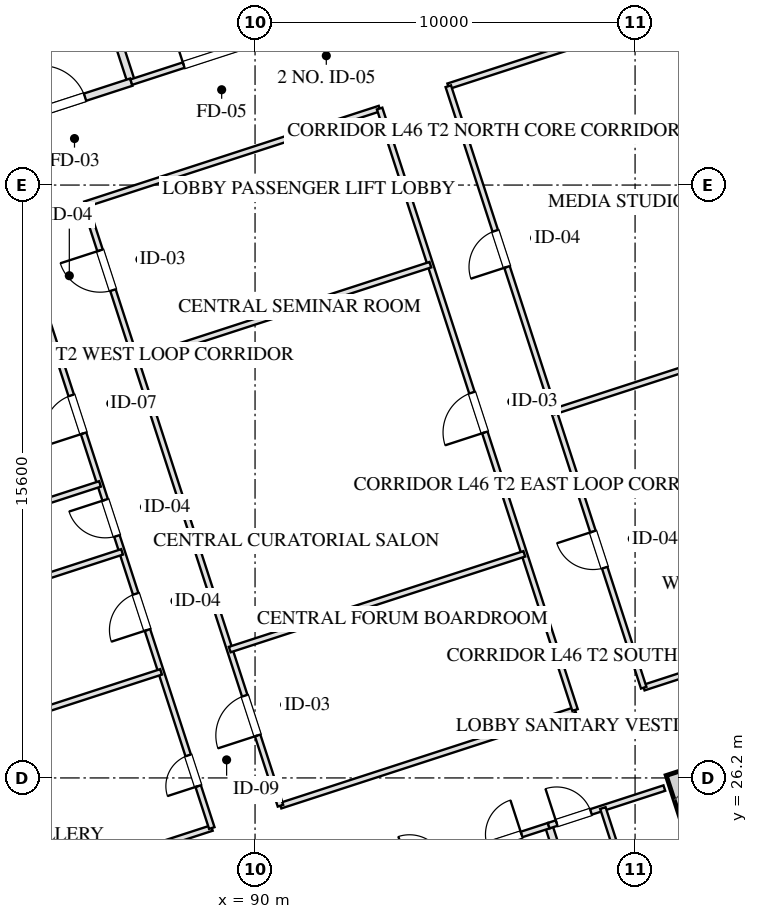
"""IFC4 building model, lengths in metres.
Left out: names, types, materials, properties, quantities, classifications, styles, units other than length and angle.
Written with IfcOpenShell. Run it as: python <this file> out.ifc"""

import sys

from ifc_helpers import new_model, si_unit, direction, frame, frame_2d, origin, place, context, subcontext, project, spatial, rectangle, extrude, element, fill, save


model = new_model("IFC4")
c1 = context("Model", 3, precision=1e-05, world=origin(), true_north=direction((0.0, 1.0)))
c2 = subcontext(c1, "Body", "Model", "MODEL_VIEW")
j1 = project(units=[si_unit("LENGTHUNIT", "METRE"), si_unit("PLANEANGLEUNIT", "RADIAN")], contexts=[c1])
p1 = place(None, origin())
s1 = spatial("IfcSite", under=j1, at=p1, CompositionType="ELEMENT")
p2 = place(p1, origin())
s2 = spatial("IfcBuilding", under=s1, at=p2, CompositionType="ELEMENT")
p3 = place(p2, frame((0.0, 0.0, 173.65)))
s3 = spatial("IfcBuildingStorey", under=s2, at=p3, CompositionType="ELEMENT", Elevation=173.65)
p4 = place(p3, frame((101.105, 26.358, 0.0), z_axis=(0.0, 0.0, 1.0), x_axis=(0.309010370028, -0.95105866865, 0.0)))
e1 = element("IfcWall", 1, at=p4, inside=s3, PredefinedType="SHEAR", context=c2, shape_type="SweptSolid", body=[
    extrude(rectangle(XDim=9.48, YDim=0.6, at=frame_2d((4.74, 0.0))), origin(), (0.0, 0.0, 1.0), 3.45),
])
p5 = place(p3, frame((98.224, 59.173, 0.0), z_axis=(0.0, 0.0, 1.0), x_axis=(0.309014228706, -0.951057414911, 0.0)))
e2 = element("IfcWall", 2, at=p5, inside=s3, PredefinedType="SOLIDWALL", context=c2, shape_type="SweptSolid", body=[
    extrude(rectangle(XDim=42.8, YDim=0.4, at=frame_2d((21.4, 0.0))), origin(), (0.0, 0.0, 1.0), 2.61),
])
p6 = place(p5, frame((17.675, 0.0, 0.75)))
e3 = element("IfcOpeningElement", 3, at=p6, cuts=e2, PredefinedType="OPENING", context=c2, shape_type="SweptSolid", body=[
    extrude(rectangle(XDim=2.25, YDim=1.46, at=frame_2d((1.125, 0.73))), frame((0.0, 0.21, 0.0), z_axis=(0.0, -1.0, 0.0), x_axis=(1.0, 0.0, 0.0)), (0.0, 0.0, 1.0), 0.42),
])
p7 = place(p5, frame((13.875, 0.0, 0.75)))
e4 = element("IfcOpeningElement", 4, at=p7, cuts=e2, PredefinedType="OPENING", context=c2, shape_type="SweptSolid", body=[
    extrude(rectangle(XDim=2.25, YDim=1.46, at=frame_2d((1.125, 0.73))), frame((0.0, 0.21, 0.0), z_axis=(0.0, -1.0, 0.0), x_axis=(1.0, 0.0, 0.0)), (0.0, 0.0, 1.0), 0.42),
])
p8 = place(p5, frame((25.25, 0.0, 0.0)))
e5 = element("IfcOpeningElement", 5, at=p8, cuts=e2, PredefinedType="OPENING", context=c2, shape_type="SweptSolid", body=[
    extrude(rectangle(XDim=1.1, YDim=2.15, at=frame_2d((0.55, 1.075))), frame((0.0, 0.21, 0.0), z_axis=(0.0, -1.0, 0.0), x_axis=(1.0, 0.0, 0.0)), (0.0, 0.0, 1.0), 0.42),
])
p9 = place(p3, frame((97.727, 24.944, 0.0), z_axis=(0.0, 0.0, 1.0), x_axis=(0.309016001439, -0.951056838919, 0.0)))
e6 = element("IfcWall", 6, at=p9, inside=s3, PredefinedType="PARTITIONING", context=c2, shape_type="SweptSolid", body=[
    extrude(rectangle(XDim=8.43, YDim=0.2, at=frame_2d((4.215, 0.0))), origin(), (0.0, 0.0, 1.0), 3.175),
])
p10 = place(p3, frame((93.542, 23.585, 0.0), z_axis=(0.0, 0.0, 1.0), x_axis=(0.951063829732, 0.308994485023, 0.0)))
e7 = element("IfcWall", 7, at=p10, inside=s3, PredefinedType="PARTITIONING", context=c2, shape_type="SweptSolid", body=[
    extrude(rectangle(XDim=4.4, YDim=0.15, at=frame_2d((2.2, 0.0))), origin(), (0.0, 0.0, 1.0), 3.175),
])
p11 = place(p10, frame((0.55, 0.0, 0.0)))
e8 = element("IfcOpeningElement", 8, at=p11, cuts=e7, PredefinedType="OPENING", context=c2, shape_type="SweptSolid", body=[
    extrude(rectangle(XDim=0.95, YDim=2.05, at=frame_2d((0.475, 1.025))), frame((0.0, 0.085, 0.0), z_axis=(0.0, -1.0, 0.0), x_axis=(1.0, 0.0, 0.0)), (0.0, 0.0, 1.0), 0.17),
])
p12 = place(p10, frame((2.7, 0.0, 0.0)))
e9 = element("IfcOpeningElement", 9, at=p12, cuts=e7, PredefinedType="OPENING", context=c2, shape_type="SweptSolid", body=[
    extrude(rectangle(XDim=0.95, YDim=2.05, at=frame_2d((0.475, 1.025))), frame((0.0, 0.085, 0.0), z_axis=(0.0, -1.0, 0.0), x_axis=(1.0, 0.0, 0.0)), (0.0, 0.0, 1.0), 0.17),
])
p13 = place(p3, frame((97.727, 24.944, 0.0), z_axis=(0.0, 0.0, 1.0), x_axis=(0.951036872128, 0.309077446369, 0.0)))
e10 = element("IfcWall", 10, at=p13, inside=s3, PredefinedType="PARTITIONING", context=c2, shape_type="SweptSolid", body=[
    extrude(rectangle(XDim=3.2, YDim=0.15, at=frame_2d((1.6, 0.0))), origin(), (0.0, 0.0, 1.0), 3.175),
])
p14 = place(p13, frame((0.22, 0.0, 0.0)))
e11 = element("IfcOpeningElement", 11, at=p14, cuts=e10, PredefinedType="OPENING", context=c2, shape_type="SweptSolid", body=[
    extrude(rectangle(XDim=0.95, YDim=2.05, at=frame_2d((0.475, 1.025))), frame((0.0, 0.085, 0.0), z_axis=(0.0, -1.0, 0.0), x_axis=(1.0, 0.0, 0.0)), (0.0, 0.0, 1.0), 0.17),
])
p15 = place(p3, frame((99.153, 25.408, 0.0), z_axis=(0.0, 0.0, 1.0), x_axis=(0.309016001439, -0.951056838919, 0.0)))
e12 = element("IfcWall", 12, at=p15, inside=s3, PredefinedType="PARTITIONING", context=c2, shape_type="SweptSolid", body=[
    extrude(rectangle(XDim=8.43, YDim=0.15, at=frame_2d((4.215, 0.0))), origin(), (0.0, 0.0, 1.0), 3.175),
])
p16 = place(p15, frame((2.55, 0.0, 0.0)))
e13 = element("IfcOpeningElement", 13, at=p16, cuts=e12, PredefinedType="OPENING", context=c2, shape_type="SweptSolid", body=[
    extrude(rectangle(XDim=0.95, YDim=2.05, at=frame_2d((0.475, 1.025))), frame((0.0, 0.085, 0.0), z_axis=(0.0, -1.0, 0.0), x_axis=(1.0, 0.0, 0.0)), (0.0, 0.0, 1.0), 0.17),
])
p17 = place(p15, frame((5.8, 0.0, 0.0)))
e14 = element("IfcOpeningElement", 14, at=p17, cuts=e12, PredefinedType="OPENING", context=c2, shape_type="SweptSolid", body=[
    extrude(rectangle(XDim=0.9, YDim=2.05, at=frame_2d((0.45, 1.025))), frame((0.0, 0.085, 0.0), z_axis=(0.0, -1.0, 0.0), x_axis=(1.0, 0.0, 0.0)), (0.0, 0.0, 1.0), 0.17),
])
p18 = place(p3, frame((86.743, 44.508, 0.0), z_axis=(0.0, 0.0, 1.0), x_axis=(-0.309016001439, 0.951056838919, 0.0)))
e15 = element("IfcWall", 15, at=p18, inside=s3, PredefinedType="PARTITIONING", context=c2, shape_type="SweptSolid", body=[
    extrude(rectangle(XDim=8.43, YDim=0.2, at=frame_2d((4.215, 0.0))), origin(), (0.0, 0.0, 1.0), 3.175),
])
p19 = place(p3, frame((83.101, 43.324, 0.0), z_axis=(0.0, 0.0, 1.0), x_axis=(0.951052804469, 0.309028417967, 0.0)))
e16 = element("IfcWall", 16, at=p19, inside=s3, PredefinedType="PARTITIONING", context=c2, shape_type="SweptSolid", body=[
    extrude(rectangle(XDim=3.83, YDim=0.2, at=frame_2d((1.915, 0.0))), origin(), (0.0, 0.0, 1.0), 3.175),
])
p20 = place(p19, frame((1.35, 0.0, 0.0)))
e17 = element("IfcOpeningElement", 17, at=p20, cuts=e16, PredefinedType="OPENING", context=c2, shape_type="SweptSolid", body=[
    extrude(rectangle(XDim=1.2, YDim=2.05, at=frame_2d((0.6, 1.025))), frame((0.0, 0.11, 0.0), z_axis=(0.0, -1.0, 0.0), x_axis=(1.0, 0.0, 0.0)), (0.0, 0.0, 1.0), 0.22),
])
p21 = place(p3, frame((86.743, 44.508, 0.0), z_axis=(0.0, 0.0, 1.0), x_axis=(0.951063829732, 0.308994485023, 0.0)))
e18 = element("IfcWall", 18, at=p21, inside=s3, PredefinedType="PARTITIONING", context=c2, shape_type="SweptSolid", body=[
    extrude(rectangle(XDim=4.4, YDim=0.15, at=frame_2d((2.2, 0.0))), origin(), (0.0, 0.0, 1.0), 3.175),
])
p22 = place(p21, frame((1.45, 0.0, 0.0)))
e19 = element("IfcOpeningElement", 19, at=p22, cuts=e18, PredefinedType="OPENING", context=c2, shape_type="SweptSolid", body=[
    extrude(rectangle(XDim=1.5, YDim=2.05, at=frame_2d((0.75, 1.025))), frame((0.0, 0.085, 0.0), z_axis=(0.0, -1.0, 0.0), x_axis=(1.0, 0.0, 0.0)), (0.0, 0.0, 1.0), 0.17),
])
p23 = place(p3, frame((77.925, 21.328, 0.0), z_axis=(0.0, 0.0, 1.0), x_axis=(0.951054972381, 0.309021746015, 0.0)))
e20 = element("IfcWall", 20, at=p23, inside=s3, PredefinedType="PARTITIONING", context=c2, shape_type="SweptSolid", body=[
    extrude(rectangle(XDim=11.5, YDim=0.15, at=frame_2d((5.75, 0.0))), origin(), (0.0, 0.0, 1.0), 3.175),
])
p24 = place(p3, frame((90.669, 25.469, 0.0), z_axis=(0.0, 0.0, 1.0), x_axis=(0.95106136293, 0.309002077568, 0.0)))
e21 = element("IfcWall", 21, at=p24, inside=s3, PredefinedType="PARTITIONING", context=c2, shape_type="SweptSolid", body=[
    extrude(rectangle(XDim=8.15, YDim=0.15, at=frame_2d((4.075, 0.0))), origin(), (0.0, 0.0, 1.0), 3.175),
])
p25 = place(p3, frame((100.227, 28.575, 0.0), z_axis=(0.0, 0.0, 1.0), x_axis=(0.95104773735, 0.309044011885, 0.0)))
e22 = element("IfcWall", 22, at=p25, inside=s3, PredefinedType="PARTITIONING", context=c2, shape_type="SweptSolid", body=[
    extrude(rectangle(XDim=7.35, YDim=0.15, at=frame_2d((3.675, 0.0))), origin(), (0.0, 0.0, 1.0), 3.175),
])
p26 = place(p3, frame((85.527, 41.295, 0.0), z_axis=(0.0, 0.0, 1.0), x_axis=(0.951055419664, 0.309020369437, 0.0)))
e23 = element("IfcWall", 23, at=p26, inside=s3, PredefinedType="PARTITIONING", context=c2, shape_type="SweptSolid", body=[
    extrude(rectangle(XDim=8.15, YDim=0.15, at=frame_2d((4.075, 0.0))), origin(), (0.0, 0.0, 1.0), 3.175),
])
p27 = place(p3, frame((95.085, 44.4, 0.0), z_axis=(0.0, 0.0, 1.0), x_axis=(0.95105749975, 0.309013967595, 0.0)))
e24 = element("IfcWall", 24, at=p27, inside=s3, PredefinedType="PARTITIONING", context=c2, shape_type="SweptSolid", body=[
    extrude(rectangle(XDim=7.35, YDim=0.15, at=frame_2d((3.675, 0.0))), origin(), (0.0, 0.0, 1.0), 3.175),
])
p28 = place(p3, frame((88.862, 24.882, 0.0), z_axis=(0.0, 0.0, 1.0), x_axis=(-0.309008771245, 0.951059188113, 0.0)))
e25 = element("IfcWall", 25, at=p28, inside=s3, PredefinedType="PARTITIONING", context=c2, shape_type="SweptSolid", body=[
    extrude(rectangle(XDim=16.64, YDim=0.15, at=frame_2d((8.32, 0.0))), origin(), (0.0, 0.0, 1.0), 3.175),
])
p29 = place(p28, frame((1.16, 0.0, 0.0)))
e26 = element("IfcOpeningElement", 26, at=p29, cuts=e25, PredefinedType="OPENING", context=c2, shape_type="SweptSolid", body=[
    extrude(rectangle(XDim=0.85, YDim=2.05, at=frame_2d((0.425, 1.025))), frame((0.0, 0.085, 0.0), z_axis=(0.0, -1.0, 0.0), x_axis=(1.0, 0.0, 0.0)), (0.0, 0.0, 1.0), 0.17),
])
p30 = place(p28, frame((5.48, 0.0, 0.0)))
e27 = element("IfcOpeningElement", 27, at=p30, cuts=e25, PredefinedType="OPENING", context=c2, shape_type="SweptSolid", body=[
    extrude(rectangle(XDim=1.0, YDim=2.05, at=frame_2d((0.5, 1.025))), frame((0.0, 0.085, 0.0), z_axis=(0.0, -1.0, 0.0), x_axis=(1.0, 0.0, 0.0)), (0.0, 0.0, 1.0), 0.17),
])
p31 = place(p28, frame((8.08, 0.0, 0.0)))
e28 = element("IfcOpeningElement", 28, at=p31, cuts=e25, PredefinedType="OPENING", context=c2, shape_type="SweptSolid", body=[
    extrude(rectangle(XDim=1.0, YDim=2.05, at=frame_2d((0.5, 1.025))), frame((0.0, 0.085, 0.0), z_axis=(0.0, -1.0, 0.0), x_axis=(1.0, 0.0, 0.0)), (0.0, 0.0, 1.0), 0.17),
])
p32 = place(p28, frame((10.92, 0.0, 0.0)))
e29 = element("IfcOpeningElement", 29, at=p32, cuts=e25, PredefinedType="OPENING", context=c2, shape_type="SweptSolid", body=[
    extrude(rectangle(XDim=1.05, YDim=2.05, at=frame_2d((0.525, 1.025))), frame((0.0, 0.085, 0.0), z_axis=(0.0, -1.0, 0.0), x_axis=(1.0, 0.0, 0.0)), (0.0, 0.0, 1.0), 0.17),
])
p33 = place(p28, frame((14.48, 0.0, 0.0)))
e30 = element("IfcOpeningElement", 30, at=p33, cuts=e25, PredefinedType="OPENING", context=c2, shape_type="SweptSolid", body=[
    extrude(rectangle(XDim=1.0, YDim=2.05, at=frame_2d((0.5, 1.025))), frame((0.0, 0.085, 0.0), z_axis=(0.0, -1.0, 0.0), x_axis=(1.0, 0.0, 0.0)), (0.0, 0.0, 1.0), 0.17),
])
p34 = place(p3, frame((90.669, 25.469, 0.0), z_axis=(0.0, 0.0, 1.0), x_axis=(-0.309022042254, 0.951054876125, 0.0)))
e31 = element("IfcWall", 31, at=p34, inside=s3, PredefinedType="PARTITIONING", context=c2, shape_type="SweptSolid", body=[
    extrude(rectangle(XDim=16.64, YDim=0.15, at=frame_2d((8.32, 0.0))), origin(), (0.0, 0.0, 1.0), 3.175),
])
p35 = place(p34, frame((1.944, 0.0, 0.0)))
e32 = element("IfcOpeningElement", 32, at=p35, cuts=e31, PredefinedType="OPENING", context=c2, shape_type="SweptSolid", body=[
    extrude(rectangle(XDim=1.1, YDim=2.05, at=frame_2d((0.55, 1.025))), frame((0.0, 0.085, 0.0), z_axis=(0.0, -1.0, 0.0), x_axis=(1.0, 0.0, 0.0)), (0.0, 0.0, 1.0), 0.17),
])
p36 = place(p34, frame((14.264, 0.0, 0.0)))
e33 = element("IfcOpeningElement", 33, at=p36, cuts=e31, PredefinedType="OPENING", context=c2, shape_type="SweptSolid", body=[
    extrude(rectangle(XDim=1.1, YDim=2.05, at=frame_2d((0.55, 1.025))), frame((0.0, 0.085, 0.0), z_axis=(0.0, -1.0, 0.0), x_axis=(1.0, 0.0, 0.0)), (0.0, 0.0, 1.0), 0.17),
])
p37 = place(p3, frame((98.42, 27.988, 0.0), z_axis=(0.0, 0.0, 1.0), x_axis=(-0.309004459387, 0.951060589068, 0.0)))
e34 = element("IfcWall", 34, at=p37, inside=s3, PredefinedType="PARTITIONING", context=c2, shape_type="SweptSolid", body=[
    extrude(rectangle(XDim=16.64, YDim=0.15, at=frame_2d((8.32, 0.0))), origin(), (0.0, 0.0, 1.0), 3.175),
])
p38 = place(p37, frame((7.68, 0.0, 0.0)))
e35 = element("IfcOpeningElement", 35, at=p38, cuts=e34, PredefinedType="OPENING", context=c2, shape_type="SweptSolid", body=[
    extrude(rectangle(XDim=1.1, YDim=2.05, at=frame_2d((0.55, 1.025))), frame((0.0, 0.085, 0.0), z_axis=(0.0, -1.0, 0.0), x_axis=(1.0, 0.0, 0.0)), (0.0, 0.0, 1.0), 0.17),
])
p39 = place(p3, frame((100.227, 28.575, 0.0), z_axis=(0.0, 0.0, 1.0), x_axis=(-0.30901773025, 0.951056277195, 0.0)))
e36 = element("IfcWall", 36, at=p39, inside=s3, PredefinedType="PARTITIONING", context=c2, shape_type="SweptSolid", body=[
    extrude(rectangle(XDim=16.64, YDim=0.15, at=frame_2d((8.32, 0.0))), origin(), (0.0, 0.0, 1.0), 3.175),
])
p40 = place(p39, frame((3.32, 0.0, 0.0)))
e37 = element("IfcOpeningElement", 37, at=p40, cuts=e36, PredefinedType="OPENING", context=c2, shape_type="SweptSolid", body=[
    extrude(rectangle(XDim=1.0, YDim=2.05, at=frame_2d((0.5, 1.025))), frame((0.0, 0.085, 0.0), z_axis=(0.0, -1.0, 0.0), x_axis=(1.0, 0.0, 0.0)), (0.0, 0.0, 1.0), 0.17),
])
p41 = place(p39, frame((11.64, 0.0, 0.0)))
e38 = element("IfcOpeningElement", 38, at=p41, cuts=e36, PredefinedType="OPENING", context=c2, shape_type="SweptSolid", body=[
    extrude(rectangle(XDim=1.0, YDim=2.05, at=frame_2d((0.5, 1.025))), frame((0.0, 0.085, 0.0), z_axis=(0.0, -1.0, 0.0), x_axis=(1.0, 0.0, 0.0)), (0.0, 0.0, 1.0), 0.17),
])
p42 = place(p3, frame((89.334, 29.578, 0.0), z_axis=(0.0, 0.0, 1.0), x_axis=(0.951052558989, 0.309029173445, 0.0)))
e39 = element("IfcWall", 39, at=p42, inside=s3, PredefinedType="PARTITIONING", context=c2, shape_type="SweptSolid", body=[
    extrude(rectangle(XDim=8.15, YDim=0.15, at=frame_2d((4.075, 0.0))), origin(), (0.0, 0.0, 1.0), 3.175),
])
p43 = place(p3, frame((86.862, 37.186, 0.0), z_axis=(0.0, 0.0, 1.0), x_axis=(0.95106422313, 0.308993274169, 0.0)))
e40 = element("IfcWall", 40, at=p43, inside=s3, PredefinedType="PARTITIONING", context=c2, shape_type="SweptSolid", body=[
    extrude(rectangle(XDim=8.15, YDim=0.15, at=frame_2d((4.075, 0.0))), origin(), (0.0, 0.0, 1.0), 3.175),
])
for number, where, z_axis, x_axis in (
    (41, (76.59, 25.437, 0.0), (0.0, 0.0, 1.0), (0.951, 0.309, 0.0)),
    (42, (75.564, 28.594, 0.0), (0.0, 0.0, 1.0), (0.951, 0.309, 0.0)),
):
    element("IfcWall", number, at=place(p3, frame(where, z_axis=z_axis, x_axis=x_axis)), inside=s3, PredefinedType="PARTITIONING", context=c2, shape_type="SweptSolid", body=[
        extrude(rectangle(XDim=11.5, YDim=0.15, at=frame_2d((5.75, 0.0))), origin(), (0.0, 0.0, 1.0), 3.175),
    ])
for number, where, z_axis, x_axis in (
    (43, (74.983, 30.382, 0.0), (0.0, 0.0, 1.0), (0.951, 0.309, 0.0)),
    (44, (73.809, 33.996, 0.0), (0.0, 0.0, 1.0), (0.951, 0.309, 0.0)),
):
    element("IfcWall", number, at=place(p3, frame(where, z_axis=z_axis, x_axis=x_axis)), inside=s3, PredefinedType="PARTITIONING", context=c2, shape_type="SweptSolid", body=[
        extrude(rectangle(XDim=11.5, YDim=0.15, at=frame_2d((5.75, 0.0))), origin(), (0.0, 0.0, 1.0), 3.175),
    ])
p44 = place(p3, frame((97.866, 35.841, 0.0), z_axis=(0.0, 0.0, 1.0), x_axis=(0.95105749975, 0.309013967595, 0.0)))
e45 = element("IfcWall", 45, at=p44, inside=s3, PredefinedType="PARTITIONING", context=c2, shape_type="SweptSolid", body=[
    extrude(rectangle(XDim=7.35, YDim=0.15, at=frame_2d((3.675, 0.0))), origin(), (0.0, 0.0, 1.0), 3.175),
])
p45 = place(p12, origin())
e46 = element("IfcDoor", 46, at=p45, inside=s3, OperationType="SINGLE_SWING_RIGHT", PredefinedType="DOOR", context=c2, shape_type="SweptSolid", body=[
    extrude(rectangle(XDim=0.95, YDim=2.05, at=frame_2d((0.475, 1.025))), frame((0.0, 0.025, 0.0), z_axis=(0.0, -1.0, 0.0), x_axis=(1.0, 0.0, 0.0)), (0.0, 0.0, 1.0), 0.05),
])
fill(e9, e46)
p46 = place(p14, origin())
e47 = element("IfcDoor", 47, at=p46, inside=s3, OperationType="SINGLE_SWING_LEFT", PredefinedType="DOOR", context=c2, shape_type="SweptSolid", body=[
    extrude(rectangle(XDim=0.95, YDim=2.05, at=frame_2d((0.475, 1.025))), frame((0.0, 0.025, 0.0), z_axis=(0.0, -1.0, 0.0), x_axis=(1.0, 0.0, 0.0)), (0.0, 0.0, 1.0), 0.05),
])
fill(e11, e47)
p47 = place(p20, origin())
e48 = element("IfcDoor", 48, at=p47, inside=s3, OperationType="SINGLE_SWING_LEFT", PredefinedType="DOOR", context=c2, shape_type="SweptSolid", body=[
    extrude(rectangle(XDim=1.2, YDim=2.05, at=frame_2d((0.6, 1.025))), frame((0.0, 0.025, 0.0), z_axis=(0.0, -1.0, 0.0), x_axis=(1.0, 0.0, 0.0)), (0.0, 0.0, 1.0), 0.05),
])
fill(e17, e48)
p48 = place(p22, origin())
e49 = element("IfcDoor", 49, at=p48, inside=s3, OperationType="SINGLE_SWING_LEFT", PredefinedType="DOOR", context=c2, shape_type="SweptSolid", body=[
    extrude(rectangle(XDim=1.5, YDim=2.05, at=frame_2d((0.75, 1.025))), frame((0.0, 0.025, 0.0), z_axis=(0.0, -1.0, 0.0), x_axis=(1.0, 0.0, 0.0)), (0.0, 0.0, 1.0), 0.05),
])
fill(e19, e49)
p49 = place(p29, origin())
e50 = element("IfcDoor", 50, at=p49, inside=s3, OperationType="SINGLE_SWING_LEFT", PredefinedType="DOOR", context=c2, shape_type="SweptSolid", body=[
    extrude(rectangle(XDim=0.85, YDim=2.05, at=frame_2d((0.425, 1.025))), frame((0.0, 0.025, 0.0), z_axis=(0.0, -1.0, 0.0), x_axis=(1.0, 0.0, 0.0)), (0.0, 0.0, 1.0), 0.05),
])
fill(e26, e50)
p50 = place(p30, origin())
e51 = element("IfcDoor", 51, at=p50, inside=s3, OperationType="SINGLE_SWING_LEFT", PredefinedType="DOOR", context=c2, shape_type="SweptSolid", body=[
    extrude(rectangle(XDim=1.0, YDim=2.05, at=frame_2d((0.5, 1.025))), frame((0.0, 0.025, 0.0), z_axis=(0.0, -1.0, 0.0), x_axis=(1.0, 0.0, 0.0)), (0.0, 0.0, 1.0), 0.05),
])
fill(e27, e51)
p51 = place(p31, origin())
e52 = element("IfcDoor", 52, at=p51, inside=s3, OperationType="SINGLE_SWING_RIGHT", PredefinedType="DOOR", context=c2, shape_type="SweptSolid", body=[
    extrude(rectangle(XDim=1.0, YDim=2.05, at=frame_2d((0.5, 1.025))), frame((0.0, 0.025, 0.0), z_axis=(0.0, -1.0, 0.0), x_axis=(1.0, 0.0, 0.0)), (0.0, 0.0, 1.0), 0.05),
])
fill(e28, e52)
p52 = place(p32, origin())
e53 = element("IfcDoor", 53, at=p52, inside=s3, OperationType="SINGLE_SWING_LEFT", PredefinedType="DOOR", context=c2, shape_type="SweptSolid", body=[
    extrude(rectangle(XDim=1.05, YDim=2.05, at=frame_2d((0.525, 1.025))), frame((0.0, 0.025, 0.0), z_axis=(0.0, -1.0, 0.0), x_axis=(1.0, 0.0, 0.0)), (0.0, 0.0, 1.0), 0.05),
])
fill(e29, e53)
p53 = place(p35, origin())
e54 = element("IfcDoor", 54, at=p53, inside=s3, OperationType="SINGLE_SWING_LEFT", PredefinedType="DOOR", context=c2, shape_type="SweptSolid", body=[
    extrude(rectangle(XDim=1.1, YDim=2.05, at=frame_2d((0.55, 1.025))), frame((0.0, 0.025, 0.0), z_axis=(0.0, -1.0, 0.0), x_axis=(1.0, 0.0, 0.0)), (0.0, 0.0, 1.0), 0.05),
])
fill(e32, e54)
p54 = place(p36, origin())
e55 = element("IfcDoor", 55, at=p54, inside=s3, OperationType="SINGLE_SWING_RIGHT", PredefinedType="DOOR", context=c2, shape_type="SweptSolid", body=[
    extrude(rectangle(XDim=1.1, YDim=2.05, at=frame_2d((0.55, 1.025))), frame((0.0, 0.025, 0.0), z_axis=(0.0, -1.0, 0.0), x_axis=(1.0, 0.0, 0.0)), (0.0, 0.0, 1.0), 0.05),
])
fill(e33, e55)
p55 = place(p38, origin())
e56 = element("IfcDoor", 56, at=p55, inside=s3, OperationType="SINGLE_SWING_LEFT", PredefinedType="DOOR", context=c2, shape_type="SweptSolid", body=[
    extrude(rectangle(XDim=1.1, YDim=2.05, at=frame_2d((0.55, 1.025))), frame((0.0, 0.025, 0.0), z_axis=(0.0, -1.0, 0.0), x_axis=(1.0, 0.0, 0.0)), (0.0, 0.0, 1.0), 0.05),
])
fill(e35, e56)
p56 = place(p40, origin())
e57 = element("IfcDoor", 57, at=p56, inside=s3, OperationType="SINGLE_SWING_RIGHT", PredefinedType="DOOR", context=c2, shape_type="SweptSolid", body=[
    extrude(rectangle(XDim=1.0, YDim=2.05, at=frame_2d((0.5, 1.025))), frame((0.0, 0.025, 0.0), z_axis=(0.0, -1.0, 0.0), x_axis=(1.0, 0.0, 0.0)), (0.0, 0.0, 1.0), 0.05),
])
fill(e37, e57)
p57 = place(p41, origin())
e58 = element("IfcDoor", 58, at=p57, inside=s3, OperationType="SINGLE_SWING_LEFT", PredefinedType="DOOR", context=c2, shape_type="SweptSolid", body=[
    extrude(rectangle(XDim=1.0, YDim=2.05, at=frame_2d((0.5, 1.025))), frame((0.0, 0.025, 0.0), z_axis=(0.0, -1.0, 0.0), x_axis=(1.0, 0.0, 0.0)), (0.0, 0.0, 1.0), 0.05),
])
fill(e38, e58)
save(model, sys.argv[1])
